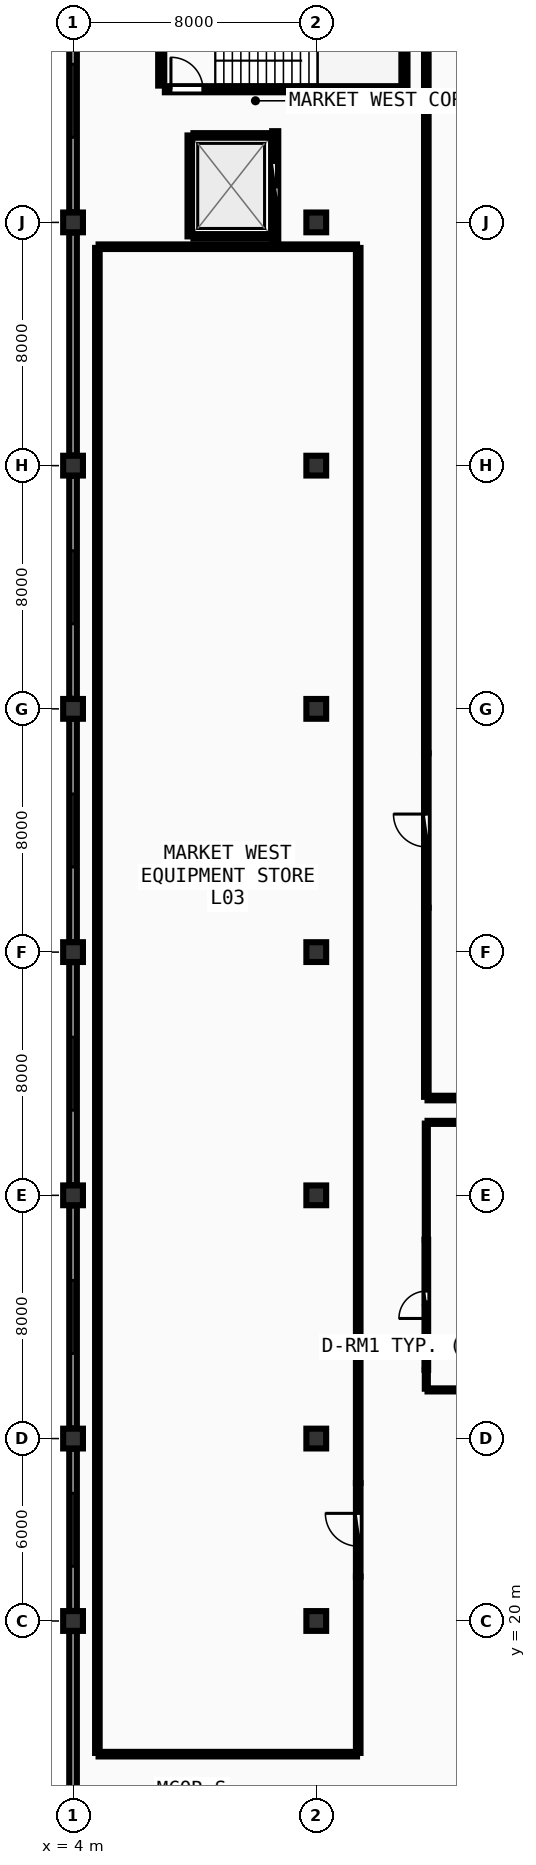
"""IFC4 building model, lengths in metres.
Left out: names, types, materials, properties, quantities, classifications, styles, units other than length and angle.
Written with IfcOpenShell. Run it as: python <this file> out.ifc"""

import sys

from ifc_helpers import new_model, si_unit, direction, frame, frame_2d, origin, origin_2d, place, context, subcontext, project, spatial, rectangle, extrude, element, fill, save


model = new_model("IFC4")
c1 = context("Model", 3, precision=1e-05, world=origin(), true_north=direction((0.0, 1.0)))
c2 = subcontext(c1, "Body", "Model", "MODEL_VIEW")
j1 = project(units=[si_unit("LENGTHUNIT", "METRE"), si_unit("PLANEANGLEUNIT", "RADIAN")], contexts=[c1])
p1 = place(None, origin())
s1 = spatial("IfcSite", under=j1, at=p1, CompositionType="ELEMENT")
p2 = place(p1, origin())
s2 = spatial("IfcBuilding", under=s1, at=p2, CompositionType="ELEMENT")
p3 = place(p2, frame((0.0, 0.0, 13.5)))
s3 = spatial("IfcBuildingStorey", under=s2, at=p3, CompositionType="ELEMENT", Elevation=13.5)
for number, where, z_axis, x_axis in (
    (1, (4.0, 20.0, 0.0), (0.0, 0.0, 1.0), (1.0, 0.0, 0.0)),
    (2, (4.0, 26.0, 0.0), (0.0, 0.0, 1.0), (1.0, 0.0, 0.0)),
    (3, (4.0, 34.0, 0.0), (0.0, 0.0, 1.0), (1.0, 0.0, 0.0)),
    (4, (4.0, 42.0, 0.0), (0.0, 0.0, 1.0), (1.0, 0.0, 0.0)),
    (5, (4.0, 50.0, 0.0), (0.0, 0.0, 1.0), (1.0, 0.0, 0.0)),
    (6, (4.0, 58.0, 0.0), (0.0, 0.0, 1.0), (1.0, 0.0, 0.0)),
    (7, (4.0, 66.0, 0.0), (0.0, 0.0, 1.0), (1.0, 0.0, 0.0)),
    (8, (12.0, 20.0, 0.0), (0.0, 0.0, 1.0), (1.0, 0.0, 0.0)),
    (9, (12.0, 26.0, 0.0), (0.0, 0.0, 1.0), (1.0, 0.0, 0.0)),
    (10, (12.0, 34.0, 0.0), (0.0, 0.0, 1.0), (1.0, 0.0, 0.0)),
    (11, (12.0, 42.0, 0.0), (0.0, 0.0, 1.0), (1.0, 0.0, 0.0)),
    (12, (12.0, 50.0, 0.0), (0.0, 0.0, 1.0), (1.0, 0.0, 0.0)),
    (13, (12.0, 58.0, 0.0), (0.0, 0.0, 1.0), (1.0, 0.0, 0.0)),
    (14, (12.0, 66.0, 0.0), (0.0, 0.0, 1.0), (1.0, 0.0, 0.0)),
):
    element("IfcColumn", number, at=place(p3, frame(where, z_axis=z_axis, x_axis=x_axis)), inside=s3, PredefinedType="COLUMN", context=c2, shape_type="SweptSolid", body=[
        extrude(rectangle(XDim=0.65, YDim=0.65, at=origin_2d()), origin(), (0.0, 0.0, 1.0), 4.5),
    ])
p4 = place(p3, frame((4.0, 73.67, 0.0), z_axis=(0.0, 0.0, 1.0), x_axis=(0.0, -1.0, 0.0)))
e15 = element("IfcWall", 15, at=p4, inside=s3, PredefinedType="SOLIDWALL", context=c2, shape_type="SweptSolid", body=[
    extrude(rectangle(XDim=7.34, YDim=0.25, at=frame_2d((3.67, 0.0))), origin(), (0.0, 0.0, 1.0), 3.42),
])
p5 = place(p4, frame((2.47, 0.0, 0.95)))
e16 = element("IfcOpeningElement", 16, at=p5, cuts=e15, PredefinedType="OPENING", context=c2, shape_type="SweptSolid", body=[
    extrude(rectangle(XDim=2.4, YDim=1.65, at=frame_2d((1.2, 0.825))), frame((0.0, 0.135, 0.0), z_axis=(0.0, -1.0, 0.0), x_axis=(1.0, 0.0, 0.0)), (0.0, 0.0, 1.0), 0.27),
])
p6 = place(p3, frame((4.0, 65.67, 0.0), z_axis=(0.0, 0.0, 1.0), x_axis=(0.0, -1.0, 0.0)))
e17 = element("IfcWall", 17, at=p6, inside=s3, PredefinedType="SOLIDWALL", context=c2, shape_type="SweptSolid", body=[
    extrude(rectangle(XDim=7.34, YDim=0.25, at=frame_2d((3.67, 0.0))), origin(), (0.0, 0.0, 1.0), 3.42),
])
p7 = place(p3, frame((4.0, 57.67, 0.0), z_axis=(0.0, 0.0, 1.0), x_axis=(0.0, -1.0, 0.0)))
e18 = element("IfcWall", 18, at=p7, inside=s3, PredefinedType="SOLIDWALL", context=c2, shape_type="SweptSolid", body=[
    extrude(rectangle(XDim=7.34, YDim=0.25, at=frame_2d((3.67, 0.0))), origin(), (0.0, 0.0, 1.0), 3.42),
])
p8 = place(p7, frame((2.47, 0.0, 0.95)))
e19 = element("IfcOpeningElement", 19, at=p8, cuts=e18, PredefinedType="OPENING", context=c2, shape_type="SweptSolid", body=[
    extrude(rectangle(XDim=2.4, YDim=1.65, at=frame_2d((1.2, 0.825))), frame((0.0, 0.135, 0.0), z_axis=(0.0, -1.0, 0.0), x_axis=(1.0, 0.0, 0.0)), (0.0, 0.0, 1.0), 0.27),
])
p9 = place(p3, frame((4.0, 49.67, 0.0), z_axis=(0.0, 0.0, 1.0), x_axis=(0.0, -1.0, 0.0)))
e20 = element("IfcWall", 20, at=p9, inside=s3, PredefinedType="SOLIDWALL", context=c2, shape_type="SweptSolid", body=[
    extrude(rectangle(XDim=7.34, YDim=0.25, at=frame_2d((3.67, 0.0))), origin(), (0.0, 0.0, 1.0), 3.42),
])
p10 = place(p9, frame((2.47, 0.0, 0.95)))
e21 = element("IfcOpeningElement", 21, at=p10, cuts=e20, PredefinedType="OPENING", context=c2, shape_type="SweptSolid", body=[
    extrude(rectangle(XDim=2.4, YDim=1.65, at=frame_2d((1.2, 0.825))), frame((0.0, 0.135, 0.0), z_axis=(0.0, -1.0, 0.0), x_axis=(1.0, 0.0, 0.0)), (0.0, 0.0, 1.0), 0.27),
])
p11 = place(p3, frame((4.0, 41.67, 0.0), z_axis=(0.0, 0.0, 1.0), x_axis=(0.0, -1.0, 0.0)))
e22 = element("IfcWall", 22, at=p11, inside=s3, PredefinedType="SOLIDWALL", context=c2, shape_type="SweptSolid", body=[
    extrude(rectangle(XDim=7.34, YDim=0.25, at=frame_2d((3.67, 0.0))), origin(), (0.0, 0.0, 1.0), 3.42),
])
p12 = place(p11, frame((2.47, 0.0, 0.95)))
e23 = element("IfcOpeningElement", 23, at=p12, cuts=e22, PredefinedType="OPENING", context=c2, shape_type="SweptSolid", body=[
    extrude(rectangle(XDim=2.4, YDim=1.65, at=frame_2d((1.2, 0.825))), frame((0.0, 0.135, 0.0), z_axis=(0.0, -1.0, 0.0), x_axis=(1.0, 0.0, 0.0)), (0.0, 0.0, 1.0), 0.27),
])
p13 = place(p3, frame((4.0, 33.67, 0.0), z_axis=(0.0, 0.0, 1.0), x_axis=(0.0, -1.0, 0.0)))
e24 = element("IfcWall", 24, at=p13, inside=s3, PredefinedType="SOLIDWALL", context=c2, shape_type="SweptSolid", body=[
    extrude(rectangle(XDim=7.34, YDim=0.25, at=frame_2d((3.67, 0.0))), origin(), (0.0, 0.0, 1.0), 3.42),
])
p14 = place(p13, frame((2.47, 0.0, 0.95)))
e25 = element("IfcOpeningElement", 25, at=p14, cuts=e24, PredefinedType="OPENING", context=c2, shape_type="SweptSolid", body=[
    extrude(rectangle(XDim=2.4, YDim=1.65, at=frame_2d((1.2, 0.825))), frame((0.0, 0.135, 0.0), z_axis=(0.0, -1.0, 0.0), x_axis=(1.0, 0.0, 0.0)), (0.0, 0.0, 1.0), 0.27),
])
p15 = place(p3, frame((4.0, 25.67, 0.0), z_axis=(0.0, 0.0, 1.0), x_axis=(0.0, -1.0, 0.0)))
e26 = element("IfcWall", 26, at=p15, inside=s3, PredefinedType="SOLIDWALL", context=c2, shape_type="SweptSolid", body=[
    extrude(rectangle(XDim=5.34, YDim=0.25, at=frame_2d((2.67, 0.0))), origin(), (0.0, 0.0, 1.0), 3.42),
])
p16 = place(p15, frame((1.47, 0.0, 0.95)))
e27 = element("IfcOpeningElement", 27, at=p16, cuts=e26, PredefinedType="OPENING", context=c2, shape_type="SweptSolid", body=[
    extrude(rectangle(XDim=2.4, YDim=1.65, at=frame_2d((1.2, 0.825))), frame((0.0, 0.135, 0.0), z_axis=(0.0, -1.0, 0.0), x_axis=(1.0, 0.0, 0.0)), (0.0, 0.0, 1.0), 0.27),
])
p17 = place(p3, frame((4.0, 19.67, 0.0), z_axis=(0.0, 0.0, 1.0), x_axis=(0.0, -1.0, 0.0)))
e28 = element("IfcWall", 28, at=p17, inside=s3, PredefinedType="SOLIDWALL", context=c2, shape_type="SweptSolid", body=[
    extrude(rectangle(XDim=7.34, YDim=0.25, at=frame_2d((3.67, 0.0))), origin(), (0.0, 0.0, 1.0), 3.42),
])
p18 = place(p3, frame((7.02, 70.38, 0.0), z_axis=(0.0, 0.0, 1.0), x_axis=(1.0, 0.0, 0.0)))
e29 = element("IfcWall", 29, at=p18, inside=s3, PredefinedType="SHEAR", context=c2, shape_type="SweptSolid", body=[
    extrude(rectangle(XDim=7.76, YDim=0.2, at=frame_2d((3.88, 0.0))), origin(), (0.0, 0.0, 1.0), 4.24),
])
p19 = place(p18, frame((0.2, 0.0, 0.0)))
e30 = element("IfcOpeningElement", 30, at=p19, cuts=e29, PredefinedType="OPENING", context=c2, shape_type="SweptSolid", body=[
    extrude(rectangle(XDim=1.05, YDim=2.1, at=frame_2d((0.525, 1.05))), frame((0.0, 0.11, 0.0), z_axis=(0.0, -1.0, 0.0), x_axis=(1.0, 0.0, 0.0)), (0.0, 0.0, 1.0), 0.22),
])
for number, where, z_axis, x_axis in (
    (31, (14.9, 70.5, 0.0), (0.0, 0.0, 1.0), (0.0, 1.0, 0.0)),
    (32, (6.9, 73.97, 0.0), (0.0, 0.0, 1.0), (0.0, -1.0, 0.0)),
):
    element("IfcWall", number, at=place(p3, frame(where, z_axis=z_axis, x_axis=x_axis)), inside=s3, PredefinedType="SHEAR", context=c2, shape_type="SweptSolid", body=[
        extrude(rectangle(XDim=3.47, YDim=0.2, at=frame_2d((1.735, 0.0))), origin(), (0.0, 0.0, 1.0), 4.24),
    ])
p20 = place(p3, frame((10.65, 65.4, 0.0), z_axis=(0.0, 0.0, 1.0), x_axis=(0.0, 1.0, 0.0)))
e33 = element("IfcWall", 33, at=p20, inside=s3, PredefinedType="SOLIDWALL", context=c2, shape_type="SweptSolid", body=[
    extrude(rectangle(XDim=3.6, YDim=0.2, at=frame_2d((1.8, 0.0))), origin(), (0.0, 0.0, 1.0), 3.425),
])
p21 = place(p20, frame((1.02, 0.0, 0.0)))
e34 = element("IfcOpeningElement", 34, at=p21, cuts=e33, PredefinedType="OPENING", context=c2, shape_type="SweptSolid", body=[
    extrude(rectangle(XDim=1.55, YDim=2.2, at=frame_2d((0.775, 1.1))), frame((0.0, 0.11, 0.0), z_axis=(0.0, -1.0, 0.0), x_axis=(1.0, 0.0, 0.0)), (0.0, 0.0, 1.0), 0.22),
])
p22 = place(p3, frame((7.84, 65.54, 0.0), z_axis=(0.0, 0.0, 1.0), x_axis=(0.0, 1.0, 0.0)))
e35 = element("IfcWall", 35, at=p22, inside=s3, PredefinedType="PARTITIONING", context=c2, shape_type="SweptSolid", body=[
    extrude(rectangle(XDim=3.32, YDim=0.15, at=frame_2d((1.66, 0.0))), origin(), (0.0, 0.0, 1.0), 3.425),
])
for number, where, z_axis, x_axis in (
    (36, (7.96, 65.54, 0.0), (0.0, 0.0, 1.0), (1.0, 0.0, 0.0)),
    (37, (7.96, 68.86, 0.0), (0.0, 0.0, 1.0), (1.0, 0.0, 0.0)),
):
    element("IfcWall", number, at=place(p3, frame(where, z_axis=z_axis, x_axis=x_axis)), inside=s3, PredefinedType="PARTITIONING", context=c2, shape_type="SweptSolid", body=[
        extrude(rectangle(XDim=2.56, YDim=0.15, at=frame_2d((1.28, 0.0))), origin(), (0.0, 0.0, 1.0), 4.23),
    ])
p23 = place(p3, frame((15.62, 28.26, 0.0), z_axis=(0.0, 0.0, 1.0), x_axis=(0.0, 1.0, 0.0)))
e38 = element("IfcWall", 38, at=p23, inside=s3, PredefinedType="PARTITIONING", context=c2, shape_type="SweptSolid", body=[
    extrude(rectangle(XDim=4.28, YDim=0.12, at=frame_2d((2.14, 0.0))), origin(), (0.0, 0.0, 1.0), 4.09),
])
p24 = place(p23, frame((1.69, 0.0, 0.0)))
e39 = element("IfcOpeningElement", 39, at=p24, cuts=e38, PredefinedType="OPENING", context=c2, shape_type="SweptSolid", body=[
    extrude(rectangle(XDim=0.9, YDim=2.08, at=frame_2d((0.45, 1.04))), frame((0.0, 0.07, 0.0), z_axis=(0.0, -1.0, 0.0), x_axis=(1.0, 0.0, 0.0)), (0.0, 0.0, 1.0), 0.14),
])
p25 = place(p3, frame((15.62, 43.46, 0.0), z_axis=(0.0, 0.0, 1.0), x_axis=(0.0, 1.0, 0.0)))
e40 = element("IfcWall", 40, at=p25, inside=s3, PredefinedType="PARTITIONING", context=c2, shape_type="SweptSolid", body=[
    extrude(rectangle(XDim=5.08, YDim=0.15, at=frame_2d((2.54, 0.0))), origin(), (0.0, 0.0, 1.0), 4.09),
])
p26 = place(p25, frame((2.0, 0.0, 0.0)))
e41 = element("IfcOpeningElement", 41, at=p26, cuts=e40, PredefinedType="OPENING", context=c2, shape_type="SweptSolid", body=[
    extrude(rectangle(XDim=1.08, YDim=2.1, at=frame_2d((0.54, 1.05))), frame((0.0, 0.085, 0.0), z_axis=(0.0, -1.0, 0.0), x_axis=(1.0, 0.0, 0.0)), (0.0, 0.0, 1.0), 0.17),
])
p27 = place(p3, frame((13.38, 21.46, 0.0), z_axis=(0.0, 0.0, 1.0), x_axis=(0.0, 1.0, 0.0)))
e42 = element("IfcWall", 42, at=p27, inside=s3, PredefinedType="PARTITIONING", context=c2, shape_type="SweptSolid", body=[
    extrude(rectangle(XDim=3.08, YDim=0.15, at=frame_2d((1.54, 0.0))), origin(), (0.0, 0.0, 1.0), 4.09),
])
p28 = place(p27, frame((1.0, 0.0, 0.0)))
e43 = element("IfcOpeningElement", 43, at=p28, cuts=e42, PredefinedType="OPENING", context=c2, shape_type="SweptSolid", body=[
    extrude(rectangle(XDim=1.08, YDim=2.1, at=frame_2d((0.54, 1.05))), frame((0.0, 0.085, 0.0), z_axis=(0.0, -1.0, 0.0), x_axis=(1.0, 0.0, 0.0)), (0.0, 0.0, 1.0), 0.17),
])
for number, where, z_axis, x_axis in (
    (44, (15.66, 27.6, 0.0), (0.0, 0.0, 1.0), (1.0, 0.0, 0.0)),
    (45, (35.16, 36.4, 0.0), (0.0, 0.0, 1.0), (-1.0, 0.0, 0.0)),
):
    element("IfcWall", number, at=place(p3, frame(where, z_axis=z_axis, x_axis=x_axis)), inside=s3, PredefinedType="PARTITIONING", context=c2, shape_type="SweptSolid", body=[
        extrude(rectangle(XDim=19.5, YDim=0.1, at=frame_2d((9.75, 0.0))), origin(), (0.0, 0.0, 1.0), 3.425),
    ])
p29 = place(p3, frame((15.62, 36.36, 0.0), z_axis=(0.0, 0.0, 1.0), x_axis=(0.0, -1.0, 0.0)))
e46 = element("IfcWall", 46, at=p29, inside=s3, PredefinedType="PARTITIONING", context=c2, shape_type="SweptSolid", body=[
    extrude(rectangle(XDim=3.82, YDim=0.1, at=frame_2d((1.91, 0.0))), origin(), (0.0, 0.0, 1.0), 3.425),
])
p30 = place(p3, frame((15.62, 28.26, 0.0), z_axis=(0.0, 0.0, 1.0), x_axis=(0.0, -1.0, 0.0)))
e47 = element("IfcWall", 47, at=p30, inside=s3, PredefinedType="PARTITIONING", context=c2, shape_type="SweptSolid", body=[
    extrude(rectangle(XDim=0.62, YDim=0.1, at=frame_2d((0.31, 0.0))), origin(), (0.0, 0.0, 1.0), 4.09),
])
p31 = place(p3, frame((15.66, 37.2, 0.0), z_axis=(0.0, 0.0, 1.0), x_axis=(1.0, 0.0, 0.0)))
e48 = element("IfcWall", 48, at=p31, inside=s3, PredefinedType="PARTITIONING", context=c2, shape_type="SweptSolid", body=[
    extrude(rectangle(XDim=19.5, YDim=0.15, at=frame_2d((9.75, 0.0))), origin(), (0.0, 0.0, 1.0), 3.425),
])
p32 = place(p3, frame((15.62, 81.16, 0.0), z_axis=(0.0, 0.0, 1.0), x_axis=(0.0, -1.0, 0.0)))
e49 = element("IfcWall", 49, at=p32, inside=s3, PredefinedType="PARTITIONING", context=c2, shape_type="SweptSolid", body=[
    extrude(rectangle(XDim=32.62, YDim=0.15, at=frame_2d((16.31, 0.0))), origin(), (0.0, 0.0, 1.0), 3.425),
])
p33 = place(p3, frame((15.62, 43.46, 0.0), z_axis=(0.0, 0.0, 1.0), x_axis=(0.0, -1.0, 0.0)))
e50 = element("IfcWall", 50, at=p33, inside=s3, PredefinedType="PARTITIONING", context=c2, shape_type="SweptSolid", body=[
    extrude(rectangle(XDim=6.22, YDim=0.15, at=frame_2d((3.11, 0.0))), origin(), (0.0, 0.0, 1.0), 3.425),
])
p34 = place(p3, frame((4.84, 15.62, 0.0), z_axis=(0.0, 0.0, 1.0), x_axis=(1.0, 0.0, 0.0)))
e51 = element("IfcWall", 51, at=p34, inside=s3, PredefinedType="PARTITIONING", context=c2, shape_type="SweptSolid", body=[
    extrude(rectangle(XDim=8.5, YDim=0.15, at=frame_2d((4.25, 0.0))), origin(), (0.0, 0.0, 1.0), 3.425),
])
p35 = place(p3, frame((13.38, 15.66, 0.0), z_axis=(0.0, 0.0, 1.0), x_axis=(0.0, 1.0, 0.0)))
e52 = element("IfcWall", 52, at=p35, inside=s3, PredefinedType="PARTITIONING", context=c2, shape_type="SweptSolid", body=[
    extrude(rectangle(XDim=5.8, YDim=0.15, at=frame_2d((2.9, 0.0))), origin(), (0.0, 0.0, 1.0), 3.425),
])
p36 = place(p3, frame((13.38, 24.54, 0.0), z_axis=(0.0, 0.0, 1.0), x_axis=(0.0, 1.0, 0.0)))
e53 = element("IfcWall", 53, at=p36, inside=s3, PredefinedType="PARTITIONING", context=c2, shape_type="SweptSolid", body=[
    extrude(rectangle(XDim=40.62, YDim=0.15, at=frame_2d((20.31, 0.0))), origin(), (0.0, 0.0, 1.0), 3.425),
])
p37 = place(p3, frame((13.34, 65.2, 0.0), z_axis=(0.0, 0.0, 1.0), x_axis=(-1.0, 0.0, 0.0)))
e54 = element("IfcWall", 54, at=p37, inside=s3, PredefinedType="PARTITIONING", context=c2, shape_type="SweptSolid", body=[
    extrude(rectangle(XDim=8.5, YDim=0.15, at=frame_2d((4.25, 0.0))), origin(), (0.0, 0.0, 1.0), 3.425),
])
p38 = place(p3, frame((4.8, 65.16, 0.0), z_axis=(0.0, 0.0, 1.0), x_axis=(0.0, -1.0, 0.0)))
e55 = element("IfcWall", 55, at=p38, inside=s3, PredefinedType="PARTITIONING", context=c2, shape_type="SweptSolid", body=[
    extrude(rectangle(XDim=49.5, YDim=0.15, at=frame_2d((24.75, 0.0))), origin(), (0.0, 0.0, 1.0), 3.425),
])
p39 = place(p5, origin())
e56 = element("IfcWindow", 56, at=p39, inside=s3, PartitioningType="SINGLE_PANEL", PredefinedType="WINDOW", context=c2, shape_type="SweptSolid", body=[
    extrude(rectangle(XDim=2.4, YDim=1.65, at=frame_2d((1.2, 0.825))), frame((0.0, 0.03, 0.0), z_axis=(0.0, -1.0, 0.0), x_axis=(1.0, 0.0, 0.0)), (0.0, 0.0, 1.0), 0.06),
])
fill(e16, e56)
p40 = place(p8, origin())
e57 = element("IfcWindow", 57, at=p40, inside=s3, PartitioningType="SINGLE_PANEL", PredefinedType="WINDOW", context=c2, shape_type="SweptSolid", body=[
    extrude(rectangle(XDim=2.4, YDim=1.65, at=frame_2d((1.2, 0.825))), frame((0.0, 0.03, 0.0), z_axis=(0.0, -1.0, 0.0), x_axis=(1.0, 0.0, 0.0)), (0.0, 0.0, 1.0), 0.06),
])
fill(e19, e57)
p41 = place(p10, origin())
e58 = element("IfcWindow", 58, at=p41, inside=s3, PartitioningType="SINGLE_PANEL", PredefinedType="WINDOW", context=c2, shape_type="SweptSolid", body=[
    extrude(rectangle(XDim=2.4, YDim=1.65, at=frame_2d((1.2, 0.825))), frame((0.0, 0.03, 0.0), z_axis=(0.0, -1.0, 0.0), x_axis=(1.0, 0.0, 0.0)), (0.0, 0.0, 1.0), 0.06),
])
fill(e21, e58)
p42 = place(p12, origin())
e59 = element("IfcWindow", 59, at=p42, inside=s3, PartitioningType="SINGLE_PANEL", PredefinedType="WINDOW", context=c2, shape_type="SweptSolid", body=[
    extrude(rectangle(XDim=2.4, YDim=1.65, at=frame_2d((1.2, 0.825))), frame((0.0, 0.03, 0.0), z_axis=(0.0, -1.0, 0.0), x_axis=(1.0, 0.0, 0.0)), (0.0, 0.0, 1.0), 0.06),
])
fill(e23, e59)
p43 = place(p14, origin())
e60 = element("IfcWindow", 60, at=p43, inside=s3, PartitioningType="SINGLE_PANEL", PredefinedType="WINDOW", context=c2, shape_type="SweptSolid", body=[
    extrude(rectangle(XDim=2.4, YDim=1.65, at=frame_2d((1.2, 0.825))), frame((0.0, 0.03, 0.0), z_axis=(0.0, -1.0, 0.0), x_axis=(1.0, 0.0, 0.0)), (0.0, 0.0, 1.0), 0.06),
])
fill(e25, e60)
p44 = place(p16, origin())
e61 = element("IfcWindow", 61, at=p44, inside=s3, PartitioningType="SINGLE_PANEL", PredefinedType="WINDOW", context=c2, shape_type="SweptSolid", body=[
    extrude(rectangle(XDim=2.4, YDim=1.65, at=frame_2d((1.2, 0.825))), frame((0.0, 0.03, 0.0), z_axis=(0.0, -1.0, 0.0), x_axis=(1.0, 0.0, 0.0)), (0.0, 0.0, 1.0), 0.06),
])
fill(e27, e61)
p45 = place(p19, origin())
e62 = element("IfcDoor", 62, at=p45, inside=s3, OperationType="SINGLE_SWING_LEFT", PredefinedType="DOOR", context=c2, shape_type="SweptSolid", body=[
    extrude(rectangle(XDim=1.05, YDim=2.1, at=frame_2d((0.525, 1.05))), frame((0.0, 0.025, 0.0), z_axis=(0.0, -1.0, 0.0), x_axis=(1.0, 0.0, 0.0)), (0.0, 0.0, 1.0), 0.05),
])
fill(e30, e62)
p46 = place(p21, origin())
e63 = element("IfcDoor", 63, at=p46, inside=s3, OperationType="DOUBLE_DOOR_SLIDING", PredefinedType="DOOR", context=c2, shape_type="SweptSolid", body=[
    extrude(rectangle(XDim=1.55, YDim=2.2, at=frame_2d((0.775, 1.1))), frame((0.0, 0.025, 0.0), z_axis=(0.0, -1.0, 0.0), x_axis=(1.0, 0.0, 0.0)), (0.0, 0.0, 1.0), 0.05),
])
fill(e34, e63)
p47 = place(p24, origin())
e64 = element("IfcDoor", 64, at=p47, inside=s3, OperationType="SINGLE_SWING_LEFT", PredefinedType="DOOR", context=c2, shape_type="SweptSolid", body=[
    extrude(rectangle(XDim=0.9, YDim=2.08, at=frame_2d((0.45, 1.04))), frame((0.0, 0.025, 0.0), z_axis=(0.0, -1.0, 0.0), x_axis=(1.0, 0.0, 0.0)), (0.0, 0.0, 1.0), 0.05),
])
fill(e39, e64)
p48 = place(p26, origin())
e65 = element("IfcDoor", 65, at=p48, inside=s3, OperationType="SINGLE_SWING_RIGHT", PredefinedType="DOOR", context=c2, shape_type="SweptSolid", body=[
    extrude(rectangle(XDim=1.08, YDim=2.1, at=frame_2d((0.54, 1.05))), frame((0.0, 0.025, 0.0), z_axis=(0.0, -1.0, 0.0), x_axis=(1.0, 0.0, 0.0)), (0.0, 0.0, 1.0), 0.05),
])
fill(e41, e65)
p49 = place(p28, origin())
e66 = element("IfcDoor", 66, at=p49, inside=s3, OperationType="SINGLE_SWING_RIGHT", PredefinedType="DOOR", context=c2, shape_type="SweptSolid", body=[
    extrude(rectangle(XDim=1.08, YDim=2.1, at=frame_2d((0.54, 1.05))), frame((0.0, 0.025, 0.0), z_axis=(0.0, -1.0, 0.0), x_axis=(1.0, 0.0, 0.0)), (0.0, 0.0, 1.0), 0.05),
])
fill(e43, e66)
save(model, sys.argv[1])
